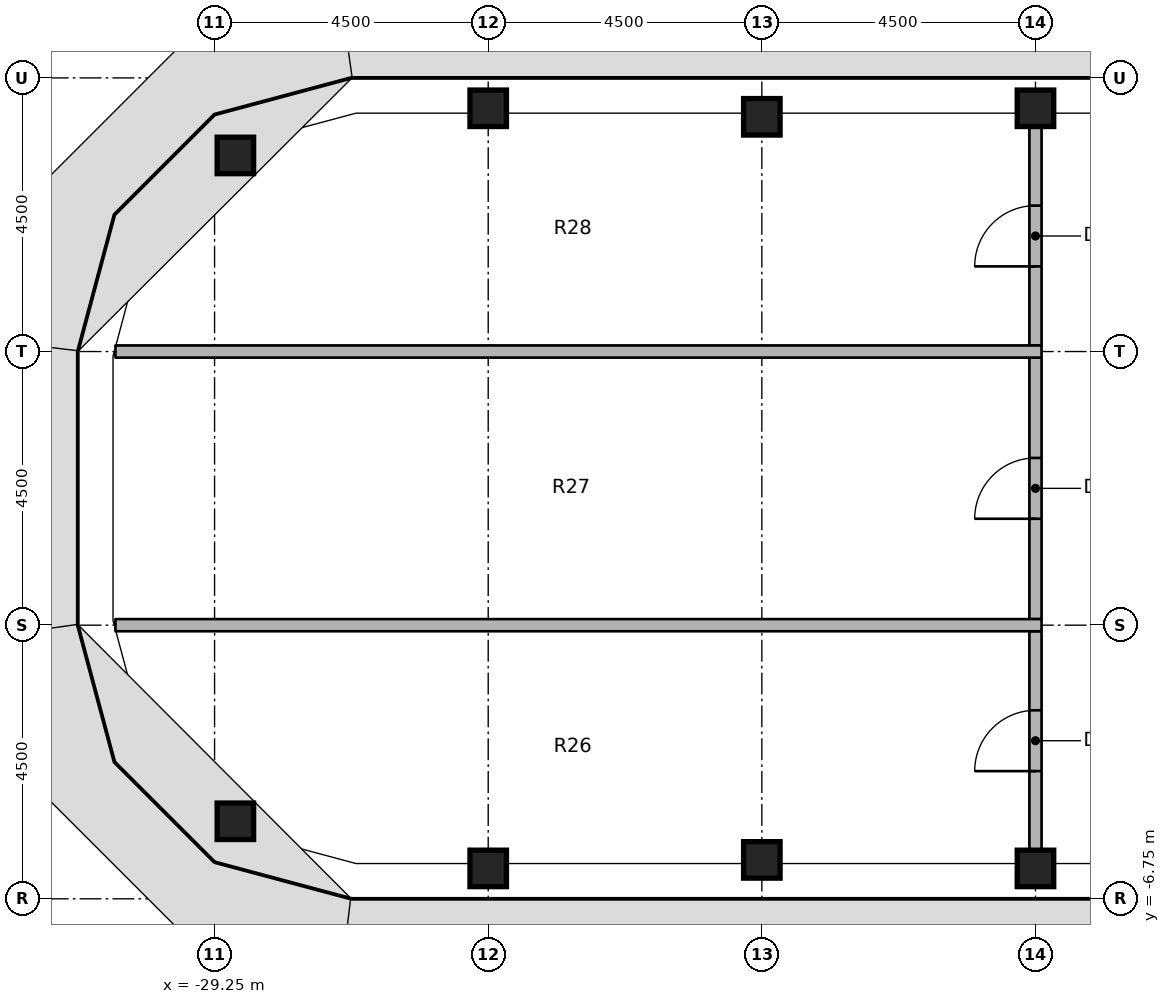
"""IFC4 building model, lengths in metres.
Left out: names, types, materials, properties, quantities, classifications, styles, units other than length and angle.
Written with IfcOpenShell. Run it as: python <this file> out.ifc"""

import sys

from ifc_helpers import new_model, si_unit, direction, frame, frame_2d, origin, origin_2d, place, context, subcontext, project, spatial, rectangle, extrude, element, fill, save


model = new_model("IFC4")
c1 = context("Model", 3, precision=1e-05, world=origin(), true_north=direction((0.0, 1.0)))
c2 = subcontext(c1, "Body", "Model", "MODEL_VIEW")
j1 = project(units=[si_unit("LENGTHUNIT", "METRE"), si_unit("PLANEANGLEUNIT", "RADIAN")], contexts=[c1])
p1 = place(None, origin())
s1 = spatial("IfcSite", under=j1, at=p1, CompositionType="ELEMENT")
p2 = place(p1, origin())
s2 = spatial("IfcBuilding", under=s1, at=p2, CompositionType="ELEMENT")
p3 = place(p2, frame((0.0, 0.0, 265.0)))
s3 = spatial("IfcBuildingStorey", under=s2, at=p3, CompositionType="ELEMENT", Elevation=265.0)
for number, where, z_axis, x_axis in (
    (1, (-28.908, -5.475, 0.0), (0.0, 0.0, 1.0), (1.0, 0.0, 0.0)),
    (2, (-28.908, 5.475, 0.0), (0.0, 0.0, 1.0), (1.0, 0.0, 0.0)),
    (3, (-24.75, -6.25, 0.0), (0.0, 0.0, 1.0), (1.0, 0.0, 0.0)),
    (4, (-24.75, 6.25, 0.0), (0.0, 0.0, 1.0), (1.0, 0.0, 0.0)),
    (5, (-20.25, -6.11, 0.0), (0.0, 0.0, 1.0), (1.0, 0.0, 0.0)),
    (6, (-20.25, 6.11, 0.0), (0.0, 0.0, 1.0), (1.0, 0.0, 0.0)),
    (7, (-15.75, -6.25, 0.0), (0.0, 0.0, 1.0), (1.0, 0.0, 0.0)),
    (8, (-15.75, 6.25, 0.0), (0.0, 0.0, 1.0), (1.0, 0.0, 0.0)),
):
    element("IfcColumn", number, at=place(p3, frame(where, z_axis=z_axis, x_axis=x_axis)), inside=s3, PredefinedType="COLUMN", context=c2, shape_type="SweptSolid", body=[
        extrude(rectangle(XDim=0.6, YDim=0.6, at=origin_2d()), origin(), (0.0, 0.0, 1.0), 3.65),
    ])
p4 = place(p3, frame((-15.75, -5.95, 0.0), z_axis=(0.0, 0.0, 1.0), x_axis=(0.0, 1.0, 0.0)))
e9 = element("IfcWall", 9, at=p4, inside=s3, PredefinedType="PARTITIONING", context=c2, shape_type="SweptSolid", body=[
    extrude(rectangle(XDim=3.6, YDim=0.2, at=frame_2d((1.8, 0.0))), origin(), (0.0, 0.0, 1.0), 2.75),
])
p5 = place(p4, frame((1.3, 0.0, 0.0)))
e10 = element("IfcOpeningElement", 10, at=p5, cuts=e9, PredefinedType="OPENING", context=c2, shape_type="SweptSolid", body=[
    extrude(rectangle(XDim=1.0, YDim=2.1, at=frame_2d((0.5, 1.05))), frame((0.0, 0.11, 0.0), z_axis=(0.0, -1.0, 0.0), x_axis=(1.0, 0.0, 0.0)), (0.0, 0.0, 1.0), 0.22),
])
p6 = place(p3, frame((-15.75, -2.15, 0.0), z_axis=(0.0, 0.0, 1.0), x_axis=(0.0, 1.0, 0.0)))
e11 = element("IfcWall", 11, at=p6, inside=s3, PredefinedType="PARTITIONING", context=c2, shape_type="SweptSolid", body=[
    extrude(rectangle(XDim=4.3, YDim=0.2, at=frame_2d((2.15, 0.0))), origin(), (0.0, 0.0, 1.0), 2.75),
])
p7 = place(p6, frame((1.65, 0.0, 0.0)))
e12 = element("IfcOpeningElement", 12, at=p7, cuts=e11, PredefinedType="OPENING", context=c2, shape_type="SweptSolid", body=[
    extrude(rectangle(XDim=1.0, YDim=2.1, at=frame_2d((0.5, 1.05))), frame((0.0, 0.11, 0.0), z_axis=(0.0, -1.0, 0.0), x_axis=(1.0, 0.0, 0.0)), (0.0, 0.0, 1.0), 0.22),
])
p8 = place(p3, frame((-15.75, 2.35, 0.0), z_axis=(0.0, 0.0, 1.0), x_axis=(0.0, 1.0, 0.0)))
e13 = element("IfcWall", 13, at=p8, inside=s3, PredefinedType="PARTITIONING", context=c2, shape_type="SweptSolid", body=[
    extrude(rectangle(XDim=3.6, YDim=0.2, at=frame_2d((1.8, 0.0))), origin(), (0.0, 0.0, 1.0), 2.75),
])
p9 = place(p8, frame((1.3, 0.0, 0.0)))
e14 = element("IfcOpeningElement", 14, at=p9, cuts=e13, PredefinedType="OPENING", context=c2, shape_type="SweptSolid", body=[
    extrude(rectangle(XDim=1.0, YDim=2.1, at=frame_2d((0.5, 1.05))), frame((0.0, 0.11, 0.0), z_axis=(0.0, -1.0, 0.0), x_axis=(1.0, 0.0, 0.0)), (0.0, 0.0, 1.0), 0.22),
])
for number, where, z_axis, x_axis in (
    (15, (-30.88, -2.25, 0.0), (0.0, 0.0, 1.0), (1.0, 0.0, 0.0)),
    (16, (-30.88, 2.25, 0.0), (0.0, 0.0, 1.0), (1.0, 0.0, 0.0)),
):
    element("IfcWall", number, at=place(p3, frame(where, z_axis=z_axis, x_axis=x_axis)), inside=s3, PredefinedType="PARTITIONING", context=c2, shape_type="SweptSolid", body=[
        extrude(rectangle(XDim=15.23, YDim=0.2, at=frame_2d((7.615, 0.0))), origin(), (0.0, 0.0, 1.0), 2.75),
    ])
p10 = place(p5, origin())
e17 = element("IfcDoor", 17, at=p10, inside=s3, OperationType="SINGLE_SWING_LEFT", PredefinedType="DOOR", context=c2, shape_type="SweptSolid", body=[
    extrude(rectangle(XDim=1.0, YDim=2.1, at=frame_2d((0.5, 1.05))), frame((0.0, 0.025, 0.0), z_axis=(0.0, -1.0, 0.0), x_axis=(1.0, 0.0, 0.0)), (0.0, 0.0, 1.0), 0.05),
])
fill(e10, e17)
p11 = place(p7, origin())
e18 = element("IfcDoor", 18, at=p11, inside=s3, OperationType="SINGLE_SWING_RIGHT", PredefinedType="DOOR", context=c2, shape_type="SweptSolid", body=[
    extrude(rectangle(XDim=1.0, YDim=2.1, at=frame_2d((0.5, 1.05))), frame((0.0, 0.025, 0.0), z_axis=(0.0, -1.0, 0.0), x_axis=(1.0, 0.0, 0.0)), (0.0, 0.0, 1.0), 0.05),
])
fill(e12, e18)
p12 = place(p9, origin())
e19 = element("IfcDoor", 19, at=p12, inside=s3, OperationType="SINGLE_SWING_RIGHT", PredefinedType="DOOR", context=c2, shape_type="SweptSolid", body=[
    extrude(rectangle(XDim=1.0, YDim=2.1, at=frame_2d((0.5, 1.05))), frame((0.0, 0.025, 0.0), z_axis=(0.0, -1.0, 0.0), x_axis=(1.0, 0.0, 0.0)), (0.0, 0.0, 1.0), 0.05),
])
fill(e14, e19)
save(model, sys.argv[1])
